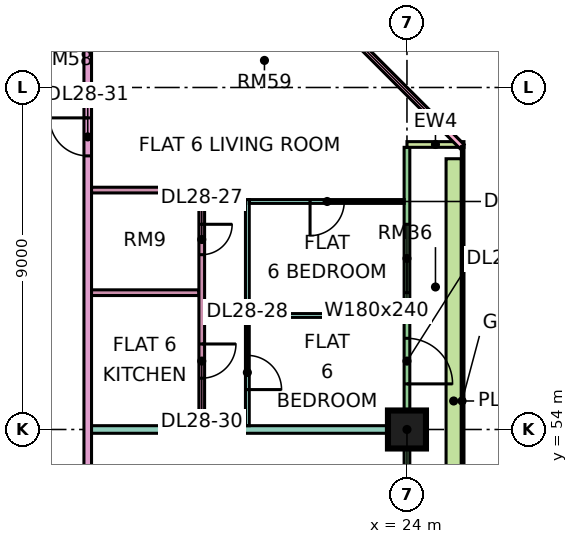
"""IFC4 building model, lengths in metres.
Left out: names, types, materials, properties, quantities, classifications, styles, units other than length and angle.
Written with IfcOpenShell. Run it as: python <this file> out.ifc"""

import sys

from ifc_helpers import new_model, si_unit, direction, frame, frame_2d, origin, origin_2d, place, context, subcontext, project, spatial, rectangle, extrude, element, fill, save


model = new_model("IFC4")
c1 = context("Model", 3, precision=1e-05, world=origin(), true_north=direction((0.0, 1.0)))
c2 = subcontext(c1, "Body", "Model", "MODEL_VIEW")
j1 = project(units=[si_unit("LENGTHUNIT", "METRE"), si_unit("PLANEANGLEUNIT", "RADIAN")], contexts=[c1])
p1 = place(None, origin())
s1 = spatial("IfcSite", under=j1, at=p1, CompositionType="ELEMENT")
p2 = place(p1, origin())
s2 = spatial("IfcBuilding", under=s1, at=p2, CompositionType="ELEMENT")
p3 = place(p2, frame((0.0, 0.0, 121.9)))
s3 = spatial("IfcBuildingStorey", under=s2, at=p3, CompositionType="ELEMENT", Elevation=121.9)
p4 = place(p3, frame((24.0, 54.0, 0.0), z_axis=(0.0, 0.0, 1.0), x_axis=(1.0, 0.0, 0.0)))
e1 = element("IfcColumn", 1, at=p4, inside=s3, PredefinedType="COLUMN", context=c2, shape_type="SweptSolid", body=[
    extrude(rectangle(XDim=1.0, YDim=1.0, at=origin_2d()), origin(), (0.0, 0.0, 1.0), 3.75),
])
p5 = place(p3, frame((24.0, 48.075, 0.0), z_axis=(0.0, 0.0, 1.0), x_axis=(0.0, 1.0, 0.0)))
e2 = element("IfcWall", 2, at=p5, inside=s3, PredefinedType="SOLIDWALL", context=c2, shape_type="SweptSolid", body=[
    extrude(rectangle(XDim=13.35, YDim=0.15, at=frame_2d((6.675, 0.0))), origin(), (0.0, 0.0, 1.0), 3.35),
])
p6 = place(p5, frame((0.562, 0.0, 0.45)))
e3 = element("IfcOpeningElement", 3, at=p6, cuts=e2, PredefinedType="OPENING", context=c2, shape_type="SweptSolid", body=[
    extrude(rectangle(XDim=4.2, YDim=2.4, at=frame_2d((2.1, 1.2))), frame((0.0, 0.085, 0.0), z_axis=(0.0, -1.0, 0.0), x_axis=(1.0, 0.0, 0.0)), (0.0, 0.0, 1.0), 0.17),
])
p7 = place(p5, frame((7.125, 0.0, 0.0)))
e4 = element("IfcOpeningElement", 4, at=p7, cuts=e2, PredefinedType="OPENING", context=c2, shape_type="SweptSolid", body=[
    extrude(rectangle(XDim=1.2, YDim=2.4, at=frame_2d((0.6, 1.2))), frame((0.0, 0.085, 0.0), z_axis=(0.0, -1.0, 0.0), x_axis=(1.0, 0.0, 0.0)), (0.0, 0.0, 1.0), 0.17),
])
p8 = place(p5, frame((9.525, 0.0, 0.45)))
e5 = element("IfcOpeningElement", 5, at=p8, cuts=e2, PredefinedType="OPENING", context=c2, shape_type="SweptSolid", body=[
    extrude(rectangle(XDim=1.8, YDim=2.4, at=frame_2d((0.9, 1.2))), frame((0.0, 0.085, 0.0), z_axis=(0.0, -1.0, 0.0), x_axis=(1.0, 0.0, 0.0)), (0.0, 0.0, 1.0), 0.17),
])
p9 = place(p3, frame((25.5, 61.5, 0.0), z_axis=(0.0, 0.0, 1.0), x_axis=(-1.0, 0.0, 0.0)))
e6 = element("IfcWall", 6, at=p9, inside=s3, PredefinedType="SOLIDWALL", context=c2, shape_type="SweptSolid", body=[
    extrude(rectangle(XDim=1.5, YDim=0.15, at=frame_2d((0.75, 0.0))), origin(), (0.0, 0.0, 1.0), 3.35),
])
p10 = place(p3, frame((25.447, 61.447, 0.0), z_axis=(0.0, 0.0, 1.0), x_axis=(-0.707106781187, 0.707106781187, 0.0)))
e7 = element("IfcWall", 7, at=p10, inside=s3, PredefinedType="SOLIDWALL", context=c2, shape_type="SweptSolid", body=[
    extrude(rectangle(XDim=4.243, YDim=0.15, at=frame_2d((2.121, 0.0))), origin(), (0.0, 0.0, 1.0), 3.35),
])
p11 = place(p10, frame((0.621, 0.0, 0.45)))
e8 = element("IfcOpeningElement", 8, at=p11, cuts=e7, PredefinedType="OPENING", context=c2, shape_type="SweptSolid", body=[
    extrude(rectangle(XDim=3.0, YDim=2.4, at=frame_2d((1.5, 1.2))), frame((0.0, 0.085, 0.0), z_axis=(0.0, -1.0, 0.0), x_axis=(1.0, 0.0, 0.0)), (0.0, 0.0, 1.0), 0.17),
])
p12 = place(p3, frame((25.229, 48.375, 0.0), z_axis=(0.0, 0.0, 1.0), x_axis=(0.0, 1.0, 0.0)))
e9 = element("IfcWall", 9, at=p12, inside=s3, PredefinedType="SOLIDWALL", context=c2, shape_type="SweptSolid", body=[
    extrude(rectangle(XDim=12.75, YDim=0.4, at=frame_2d((6.375, 0.0))), origin(), (0.0, 0.0, 1.0), 0.7),
])
p13 = place(p3, frame((15.6, 51.225, 0.0), z_axis=(0.0, 0.0, 1.0), x_axis=(0.0, 1.0, 0.0)))
e10 = element("IfcWall", 10, at=p13, inside=s3, PredefinedType="PARTITIONING", context=c2, shape_type="SweptSolid", body=[
    extrude(rectangle(XDim=13.125, YDim=0.2, at=frame_2d((6.562, 0.0))), origin(), (0.0, 0.0, 1.0), 3.35),
])
p14 = place(p13, frame((9.975, 0.0, 0.0)))
e11 = element("IfcOpeningElement", 11, at=p14, cuts=e10, PredefinedType="OPENING", context=c2, shape_type="SweptSolid", body=[
    extrude(rectangle(XDim=1.0, YDim=2.1, at=frame_2d((0.5, 1.05))), frame((0.0, 0.11, 0.0), z_axis=(0.0, -1.0, 0.0), x_axis=(1.0, 0.0, 0.0)), (0.0, 0.0, 1.0), 0.22),
])
p15 = place(p3, frame((15.7, 54.0, 0.0), z_axis=(0.0, 0.0, 1.0), x_axis=(1.0, 0.0, 0.0)))
e12 = element("IfcWall", 12, at=p15, inside=s3, PredefinedType="PARTITIONING", context=c2, shape_type="SweptSolid", body=[
    extrude(rectangle(XDim=8.226, YDim=0.2, at=frame_2d((4.113, 0.0))), origin(), (0.0, 0.0, 1.0), 3.35),
])
for number, where, z_axis, x_axis in (
    (13, (15.7, 57.6, 0.0), (0.0, 0.0, 1.0), (1.0, 0.0, 0.0)),
    (14, (15.7, 60.3, 0.0), (0.0, 0.0, 1.0), (1.0, 0.0, 0.0)),
):
    element("IfcWall", number, at=place(p3, frame(where, z_axis=z_axis, x_axis=x_axis)), inside=s3, PredefinedType="PARTITIONING", context=c2, shape_type="SweptSolid", body=[
        extrude(rectangle(XDim=2.825, YDim=0.15, at=frame_2d((1.413, 0.0))), origin(), (0.0, 0.0, 1.0), 3.35),
    ])
p16 = place(p3, frame((18.6, 54.1, 0.0), z_axis=(0.0, 0.0, 1.0), x_axis=(0.0, 1.0, 0.0)))
e15 = element("IfcWall", 15, at=p16, inside=s3, PredefinedType="PARTITIONING", context=c2, shape_type="SweptSolid", body=[
    extrude(rectangle(XDim=6.275, YDim=0.15, at=frame_2d((3.137, 0.0))), origin(), (0.0, 0.0, 1.0), 3.35),
])
p17 = place(p16, frame((4.5, 0.0, 0.0)))
e16 = element("IfcOpeningElement", 16, at=p17, cuts=e15, PredefinedType="OPENING", context=c2, shape_type="SweptSolid", body=[
    extrude(rectangle(XDim=0.8, YDim=2.1, at=frame_2d((0.4, 1.05))), frame((0.0, 0.085, 0.0), z_axis=(0.0, -1.0, 0.0), x_axis=(1.0, 0.0, 0.0)), (0.0, 0.0, 1.0), 0.17),
])
p18 = place(p16, frame((1.25, 0.0, 0.0)))
e17 = element("IfcOpeningElement", 17, at=p18, cuts=e15, PredefinedType="OPENING", context=c2, shape_type="SweptSolid", body=[
    extrude(rectangle(XDim=0.9, YDim=2.1, at=frame_2d((0.45, 1.05))), frame((0.0, 0.085, 0.0), z_axis=(0.0, -1.0, 0.0), x_axis=(1.0, 0.0, 0.0)), (0.0, 0.0, 1.0), 0.17),
])
p19 = place(p3, frame((19.8, 54.1, 0.0), z_axis=(0.0, 0.0, 1.0), x_axis=(0.0, 1.0, 0.0)))
e18 = element("IfcWall", 18, at=p19, inside=s3, PredefinedType="PARTITIONING", context=c2, shape_type="SweptSolid", body=[
    extrude(rectangle(XDim=5.95, YDim=0.1, at=frame_2d((2.975, 0.0))), origin(), (0.0, 0.0, 1.0), 3.35),
])
p20 = place(p19, frame((0.95, 0.0, 0.0)))
e19 = element("IfcOpeningElement", 19, at=p20, cuts=e18, PredefinedType="OPENING", context=c2, shape_type="SweptSolid", body=[
    extrude(rectangle(XDim=0.9, YDim=2.1, at=frame_2d((0.45, 1.05))), frame((0.0, 0.06, 0.0), z_axis=(0.0, -1.0, 0.0), x_axis=(1.0, 0.0, 0.0)), (0.0, 0.0, 1.0), 0.12),
])
p21 = place(p3, frame((19.85, 57.0, 0.0), z_axis=(0.0, 0.0, 1.0), x_axis=(1.0, 0.0, 0.0)))
e20 = element("IfcWall", 20, at=p21, inside=s3, PredefinedType="PARTITIONING", context=c2, shape_type="SweptSolid", body=[
    extrude(rectangle(XDim=4.076, YDim=0.1, at=frame_2d((2.038, 0.0))), origin(), (0.0, 0.0, 1.0), 3.35),
])
p22 = place(p3, frame((19.85, 60.0, 0.0), z_axis=(0.0, 0.0, 1.0), x_axis=(1.0, 0.0, 0.0)))
e21 = element("IfcWall", 21, at=p22, inside=s3, PredefinedType="PARTITIONING", context=c2, shape_type="SweptSolid", body=[
    extrude(rectangle(XDim=4.076, YDim=0.1, at=frame_2d((2.038, 0.0))), origin(), (0.0, 0.0, 1.0), 3.35),
])
p23 = place(p22, frame((1.6, 0.0, 0.0)))
e22 = element("IfcOpeningElement", 22, at=p23, cuts=e21, PredefinedType="OPENING", context=c2, shape_type="SweptSolid", body=[
    extrude(rectangle(XDim=0.9, YDim=2.1, at=frame_2d((0.45, 1.05))), frame((0.0, 0.06, 0.0), z_axis=(0.0, -1.0, 0.0), x_axis=(1.0, 0.0, 0.0)), (0.0, 0.0, 1.0), 0.12),
])
p24 = place(p7, frame((1.2, 0.0, 0.0), z_axis=(0.0, 0.0, 1.0), x_axis=(-1.0, 0.0, 0.0)))
e23 = element("IfcDoor", 23, at=p24, inside=s3, OperationType="DOUBLE_DOOR_SINGLE_SWING", PredefinedType="DOOR", context=c2, shape_type="SweptSolid", body=[
    extrude(rectangle(XDim=1.2, YDim=2.4, at=frame_2d((0.6, 1.2))), frame((0.0, 0.025, 0.0), z_axis=(0.0, -1.0, 0.0), x_axis=(1.0, 0.0, 0.0)), (0.0, 0.0, 1.0), 0.05),
])
fill(e4, e23)
p25 = place(p8, origin())
e24 = element("IfcWindow", 24, at=p25, inside=s3, PartitioningType="SINGLE_PANEL", PredefinedType="WINDOW", context=c2, shape_type="SweptSolid", body=[
    extrude(rectangle(XDim=1.8, YDim=2.4, at=frame_2d((0.9, 1.2))), frame((0.0, 0.03, 0.0), z_axis=(0.0, -1.0, 0.0), x_axis=(1.0, 0.0, 0.0)), (0.0, 0.0, 1.0), 0.06),
])
fill(e5, e24)
p26 = place(p11, origin())
e25 = element("IfcWindow", 25, at=p26, inside=s3, PartitioningType="SINGLE_PANEL", PredefinedType="WINDOW", context=c2, shape_type="SweptSolid", body=[
    extrude(rectangle(XDim=3.0, YDim=2.4, at=frame_2d((1.5, 1.2))), frame((0.0, 0.03, 0.0), z_axis=(0.0, -1.0, 0.0), x_axis=(1.0, 0.0, 0.0)), (0.0, 0.0, 1.0), 0.06),
])
fill(e8, e25)
p27 = place(p17, origin())
e26 = element("IfcDoor", 26, at=p27, inside=s3, OperationType="SINGLE_SWING_RIGHT", PredefinedType="DOOR", context=c2, shape_type="SweptSolid", body=[
    extrude(rectangle(XDim=0.8, YDim=2.1, at=frame_2d((0.4, 1.05))), frame((0.0, 0.025, 0.0), z_axis=(0.0, -1.0, 0.0), x_axis=(1.0, 0.0, 0.0)), (0.0, 0.0, 1.0), 0.05),
])
fill(e16, e26)
p28 = place(p20, frame((0.9, 0.0, 0.0), z_axis=(0.0, 0.0, 1.0), x_axis=(-1.0, 0.0, 0.0)))
e27 = element("IfcDoor", 27, at=p28, inside=s3, OperationType="SINGLE_SWING_LEFT", PredefinedType="DOOR", context=c2, shape_type="SweptSolid", body=[
    extrude(rectangle(XDim=0.9, YDim=2.1, at=frame_2d((0.45, 1.05))), frame((0.0, 0.025, 0.0), z_axis=(0.0, -1.0, 0.0), x_axis=(1.0, 0.0, 0.0)), (0.0, 0.0, 1.0), 0.05),
])
fill(e19, e27)
p29 = place(p23, frame((0.9, 0.0, 0.0), z_axis=(0.0, 0.0, 1.0), x_axis=(-1.0, 0.0, 0.0)))
e28 = element("IfcDoor", 28, at=p29, inside=s3, OperationType="SINGLE_SWING_LEFT", PredefinedType="DOOR", context=c2, shape_type="SweptSolid", body=[
    extrude(rectangle(XDim=0.9, YDim=2.1, at=frame_2d((0.45, 1.05))), frame((0.0, 0.025, 0.0), z_axis=(0.0, -1.0, 0.0), x_axis=(1.0, 0.0, 0.0)), (0.0, 0.0, 1.0), 0.05),
])
fill(e22, e28)
p30 = place(p18, origin())
e29 = element("IfcDoor", 29, at=p30, inside=s3, OperationType="SINGLE_SWING_RIGHT", PredefinedType="DOOR", context=c2, shape_type="SweptSolid", body=[
    extrude(rectangle(XDim=0.9, YDim=2.1, at=frame_2d((0.45, 1.05))), frame((0.0, 0.025, 0.0), z_axis=(0.0, -1.0, 0.0), x_axis=(1.0, 0.0, 0.0)), (0.0, 0.0, 1.0), 0.05),
])
fill(e17, e29)
p31 = place(p14, frame((1.0, 0.0, 0.0), z_axis=(0.0, 0.0, 1.0), x_axis=(-1.0, 0.0, 0.0)))
e30 = element("IfcDoor", 30, at=p31, inside=s3, OperationType="SINGLE_SWING_RIGHT", PredefinedType="DOOR", context=c2, shape_type="SweptSolid", body=[
    extrude(rectangle(XDim=1.0, YDim=2.1, at=frame_2d((0.5, 1.05))), frame((0.0, 0.025, 0.0), z_axis=(0.0, -1.0, 0.0), x_axis=(1.0, 0.0, 0.0)), (0.0, 0.0, 1.0), 0.05),
])
fill(e11, e30)
save(model, sys.argv[1])
